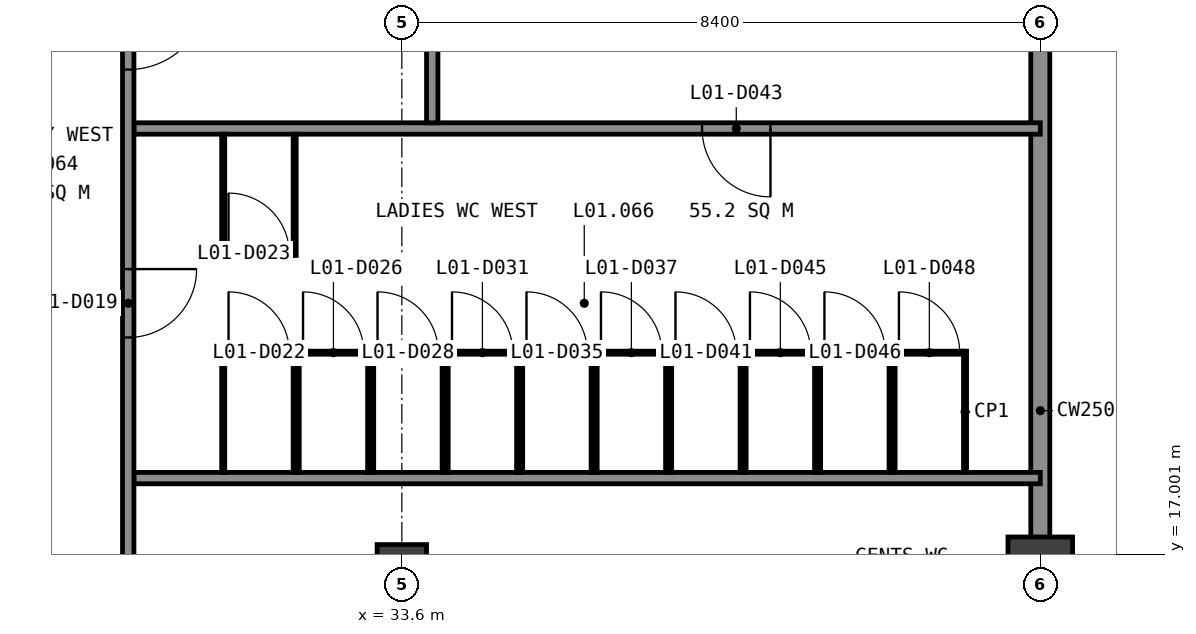
"""IFC4 building model, lengths in metres.
Left out: names, types, materials, properties, quantities, classifications, styles, units other than length and angle.
Written with IfcOpenShell. Run it as: python <this file> out.ifc"""

import sys

from ifc_helpers import new_model, si_unit, direction, frame, frame_2d, origin, origin_2d, place, context, subcontext, project, spatial, rectangle, extrude, element, fill, save


model = new_model("IFC4")
c1 = context("Model", 3, precision=1e-05, world=origin(), true_north=direction((0.0, 1.0)))
c2 = subcontext(c1, "Body", "Model", "MODEL_VIEW")
j1 = project(units=[si_unit("LENGTHUNIT", "METRE"), si_unit("PLANEANGLEUNIT", "RADIAN")], contexts=[c1])
p1 = place(None, origin())
s1 = spatial("IfcSite", under=j1, at=p1, CompositionType="ELEMENT")
p2 = place(p1, origin())
s2 = spatial("IfcBuilding", under=s1, at=p2, CompositionType="ELEMENT")
p3 = place(p2, frame((0.0, 0.0, 5.4)))
s3 = spatial("IfcBuildingStorey", under=s2, at=p3, CompositionType="ELEMENT", Elevation=5.4)
p4 = place(p3, frame((33.6, 16.8, -0.3), z_axis=(0.0, 0.0, 1.0), x_axis=(1.0, 0.0, 0.0)))
e1 = element("IfcColumn", 1, at=p4, inside=s3, PredefinedType="COLUMN", context=c2, shape_type="SweptSolid", body=[
    extrude(rectangle(XDim=0.65, YDim=0.65, at=origin_2d()), origin(), (0.0, 0.0, 1.0), 4.55),
])
p5 = place(p3, frame((42.0, 16.8, -0.3), z_axis=(0.0, 0.0, 1.0), x_axis=(1.0, 0.0, 0.0)))
e2 = element("IfcColumn", 2, at=p5, inside=s3, PredefinedType="COLUMN", context=c2, shape_type="SweptSolid", body=[
    extrude(rectangle(XDim=0.85, YDim=0.85, at=origin_2d()), origin(), (0.0, 0.0, 1.0), 4.55),
])
p6 = place(p3, frame((42.0, 12.675, -0.3), z_axis=(0.0, 0.0, 1.0), x_axis=(0.0, 1.0, 0.0)))
e3 = element("IfcWall", 3, at=p6, inside=s3, PredefinedType="SOLIDWALL", context=c2, shape_type="SweptSolid", body=[
    extrude(rectangle(XDim=12.425, YDim=0.25, at=frame_2d((6.212, 0.0))), origin(), (0.0, 0.0, 1.0), 3.9),
])
p7 = place(p3, frame((30.075, 18.0, 0.0), z_axis=(0.0, 0.0, 1.0), x_axis=(1.0, 0.0, 0.0)))
e4 = element("IfcWall", 4, at=p7, inside=s3, PredefinedType="PARTITIONING", context=c2, shape_type="SweptSolid", body=[
    extrude(rectangle(XDim=11.925, YDim=0.15, at=frame_2d((5.962, 0.0))), origin(), (0.0, 0.0, 1.0), 4.2),
])
p8 = place(p3, frame((30.075, 22.6, 0.0), z_axis=(0.0, 0.0, 1.0), x_axis=(1.0, 0.0, 0.0)))
e5 = element("IfcWall", 5, at=p8, inside=s3, PredefinedType="PARTITIONING", context=c2, shape_type="SweptSolid", body=[
    extrude(rectangle(XDim=11.925, YDim=0.15, at=frame_2d((5.962, 0.0))), origin(), (0.0, 0.0, 1.0), 4.2),
])
p9 = place(p8, frame((7.475, 0.0, 0.0)))
e6 = element("IfcOpeningElement", 6, at=p9, cuts=e5, PredefinedType="OPENING", context=c2, shape_type="SweptSolid", body=[
    extrude(rectangle(XDim=0.9, YDim=2.1, at=frame_2d((0.45, 1.05))), frame((0.0, 0.085, 0.0), z_axis=(0.0, -1.0, 0.0), x_axis=(1.0, 0.0, 0.0)), (0.0, 0.0, 1.0), 0.17),
])
p10 = place(p3, frame((30.0, 13.275, 0.0), z_axis=(0.0, 0.0, 1.0), x_axis=(0.0, 1.0, 0.0)))
e7 = element("IfcWall", 7, at=p10, inside=s3, PredefinedType="PARTITIONING", context=c2, shape_type="SweptSolid", body=[
    extrude(rectangle(XDim=11.825, YDim=0.15, at=frame_2d((5.913, 0.0))), origin(), (0.0, 0.0, 1.0), 4.2),
])
p11 = place(p10, frame((1.875, 0.0, 0.0)))
e8 = element("IfcOpeningElement", 8, at=p11, cuts=e7, PredefinedType="OPENING", context=c2, shape_type="SweptSolid", body=[
    extrude(rectangle(XDim=0.9, YDim=2.1, at=frame_2d((0.45, 1.05))), frame((0.0, 0.085, 0.0), z_axis=(0.0, -1.0, 0.0), x_axis=(1.0, 0.0, 0.0)), (0.0, 0.0, 1.0), 0.17),
])
p12 = place(p10, frame((6.575, 0.0, 0.0)))
e9 = element("IfcOpeningElement", 9, at=p12, cuts=e7, PredefinedType="OPENING", context=c2, shape_type="SweptSolid", body=[
    extrude(rectangle(XDim=0.9, YDim=2.1, at=frame_2d((0.45, 1.05))), frame((0.0, 0.085, 0.0), z_axis=(0.0, -1.0, 0.0), x_axis=(1.0, 0.0, 0.0)), (0.0, 0.0, 1.0), 0.17),
])
p13 = place(p10, frame((10.1, 0.0, 0.0)))
e10 = element("IfcOpeningElement", 10, at=p13, cuts=e7, PredefinedType="OPENING", context=c2, shape_type="SweptSolid", body=[
    extrude(rectangle(XDim=1.05, YDim=2.25, at=frame_2d((0.525, 1.125))), frame((0.0, 0.085, 0.0), z_axis=(0.0, -1.0, 0.0), x_axis=(1.0, 0.0, 0.0)), (0.0, 0.0, 1.0), 0.17),
])
p14 = place(p3, frame((34.0, 22.675, 0.0), z_axis=(0.0, 0.0, 1.0), x_axis=(0.0, 1.0, 0.0)))
e11 = element("IfcWall", 11, at=p14, inside=s3, PredefinedType="PARTITIONING", context=c2, shape_type="SweptSolid", body=[
    extrude(rectangle(XDim=2.425, YDim=0.15, at=frame_2d((1.212, 0.0))), origin(), (0.0, 0.0, 1.0), 4.2),
])
for number, where, z_axis, x_axis in (
    (12, (31.25, 18.075, 0.0), (0.0, 0.0, 1.0), (0.0, 1.0, 0.0)),
    (13, (32.19, 18.075, 0.0), (0.0, 0.0, 1.0), (0.0, 1.0, 0.0)),
):
    element("IfcWall", number, at=place(p3, frame(where, z_axis=z_axis, x_axis=x_axis)), inside=s3, PredefinedType="PARTITIONING", context=c2, shape_type="SweptSolid", body=[
        extrude(rectangle(XDim=1.595, YDim=0.04, at=frame_2d((0.797, 0.0))), origin(), (0.0, 0.0, 1.0), 2.0),
    ])
p15 = place(p3, frame((31.27, 19.65, 0.0), z_axis=(0.0, 0.0, 1.0), x_axis=(1.0, 0.0, 0.0)))
e14 = element("IfcWall", 14, at=p15, inside=s3, PredefinedType="PARTITIONING", context=c2, shape_type="SweptSolid", body=[
    extrude(rectangle(XDim=0.9, YDim=0.04, at=frame_2d((0.45, 0.0))), origin(), (0.0, 0.0, 1.0), 2.0),
])
p16 = place(p15, frame((0.05, 0.0, 0.0)))
e15 = element("IfcOpeningElement", 15, at=p16, cuts=e14, PredefinedType="OPENING", context=c2, shape_type="SweptSolid", body=[
    extrude(rectangle(XDim=0.8, YDim=2.0, at=frame_2d((0.4, 1.0))), frame((0.0, 0.03, 0.0), z_axis=(0.0, -1.0, 0.0), x_axis=(1.0, 0.0, 0.0)), (0.0, 0.0, 1.0), 0.06),
])
for number, where, z_axis, x_axis in (
    (16, (32.23, 18.075, 0.0), (0.0, 0.0, 1.0), (0.0, 1.0, 0.0)),
    (17, (33.17, 18.075, 0.0), (0.0, 0.0, 1.0), (0.0, 1.0, 0.0)),
):
    element("IfcWall", number, at=place(p3, frame(where, z_axis=z_axis, x_axis=x_axis)), inside=s3, PredefinedType="PARTITIONING", context=c2, shape_type="SweptSolid", body=[
        extrude(rectangle(XDim=1.595, YDim=0.04, at=frame_2d((0.797, 0.0))), origin(), (0.0, 0.0, 1.0), 2.0),
    ])
p17 = place(p3, frame((32.25, 19.65, 0.0), z_axis=(0.0, 0.0, 1.0), x_axis=(1.0, 0.0, 0.0)))
e18 = element("IfcWall", 18, at=p17, inside=s3, PredefinedType="PARTITIONING", context=c2, shape_type="SweptSolid", body=[
    extrude(rectangle(XDim=0.9, YDim=0.04, at=frame_2d((0.45, 0.0))), origin(), (0.0, 0.0, 1.0), 2.0),
])
p18 = place(p17, frame((0.05, 0.0, 0.0)))
e19 = element("IfcOpeningElement", 19, at=p18, cuts=e18, PredefinedType="OPENING", context=c2, shape_type="SweptSolid", body=[
    extrude(rectangle(XDim=0.8, YDim=2.0, at=frame_2d((0.4, 1.0))), frame((0.0, 0.03, 0.0), z_axis=(0.0, -1.0, 0.0), x_axis=(1.0, 0.0, 0.0)), (0.0, 0.0, 1.0), 0.06),
])
for number, where, z_axis, x_axis in (
    (20, (33.21, 18.075, 0.0), (0.0, 0.0, 1.0), (0.0, 1.0, 0.0)),
    (21, (34.15, 18.075, 0.0), (0.0, 0.0, 1.0), (0.0, 1.0, 0.0)),
):
    element("IfcWall", number, at=place(p3, frame(where, z_axis=z_axis, x_axis=x_axis)), inside=s3, PredefinedType="PARTITIONING", context=c2, shape_type="SweptSolid", body=[
        extrude(rectangle(XDim=1.595, YDim=0.04, at=frame_2d((0.797, 0.0))), origin(), (0.0, 0.0, 1.0), 2.0),
    ])
p19 = place(p3, frame((33.23, 19.65, 0.0), z_axis=(0.0, 0.0, 1.0), x_axis=(1.0, 0.0, 0.0)))
e22 = element("IfcWall", 22, at=p19, inside=s3, PredefinedType="PARTITIONING", context=c2, shape_type="SweptSolid", body=[
    extrude(rectangle(XDim=0.9, YDim=0.04, at=frame_2d((0.45, 0.0))), origin(), (0.0, 0.0, 1.0), 2.0),
])
p20 = place(p19, frame((0.05, 0.0, 0.0)))
e23 = element("IfcOpeningElement", 23, at=p20, cuts=e22, PredefinedType="OPENING", context=c2, shape_type="SweptSolid", body=[
    extrude(rectangle(XDim=0.8, YDim=2.0, at=frame_2d((0.4, 1.0))), frame((0.0, 0.03, 0.0), z_axis=(0.0, -1.0, 0.0), x_axis=(1.0, 0.0, 0.0)), (0.0, 0.0, 1.0), 0.06),
])
for number, where, z_axis, x_axis in (
    (24, (34.19, 18.075, 0.0), (0.0, 0.0, 1.0), (0.0, 1.0, 0.0)),
    (25, (35.13, 18.075, 0.0), (0.0, 0.0, 1.0), (0.0, 1.0, 0.0)),
):
    element("IfcWall", number, at=place(p3, frame(where, z_axis=z_axis, x_axis=x_axis)), inside=s3, PredefinedType="PARTITIONING", context=c2, shape_type="SweptSolid", body=[
        extrude(rectangle(XDim=1.595, YDim=0.04, at=frame_2d((0.797, 0.0))), origin(), (0.0, 0.0, 1.0), 2.0),
    ])
p21 = place(p3, frame((34.21, 19.65, 0.0), z_axis=(0.0, 0.0, 1.0), x_axis=(1.0, 0.0, 0.0)))
e26 = element("IfcWall", 26, at=p21, inside=s3, PredefinedType="PARTITIONING", context=c2, shape_type="SweptSolid", body=[
    extrude(rectangle(XDim=0.9, YDim=0.04, at=frame_2d((0.45, 0.0))), origin(), (0.0, 0.0, 1.0), 2.0),
])
p22 = place(p21, frame((0.05, 0.0, 0.0)))
e27 = element("IfcOpeningElement", 27, at=p22, cuts=e26, PredefinedType="OPENING", context=c2, shape_type="SweptSolid", body=[
    extrude(rectangle(XDim=0.8, YDim=2.0, at=frame_2d((0.4, 1.0))), frame((0.0, 0.03, 0.0), z_axis=(0.0, -1.0, 0.0), x_axis=(1.0, 0.0, 0.0)), (0.0, 0.0, 1.0), 0.06),
])
for number, where, z_axis, x_axis in (
    (28, (35.17, 18.075, 0.0), (0.0, 0.0, 1.0), (0.0, 1.0, 0.0)),
    (29, (36.11, 18.075, 0.0), (0.0, 0.0, 1.0), (0.0, 1.0, 0.0)),
):
    element("IfcWall", number, at=place(p3, frame(where, z_axis=z_axis, x_axis=x_axis)), inside=s3, PredefinedType="PARTITIONING", context=c2, shape_type="SweptSolid", body=[
        extrude(rectangle(XDim=1.595, YDim=0.04, at=frame_2d((0.797, 0.0))), origin(), (0.0, 0.0, 1.0), 2.0),
    ])
p23 = place(p3, frame((35.19, 19.65, 0.0), z_axis=(0.0, 0.0, 1.0), x_axis=(1.0, 0.0, 0.0)))
e30 = element("IfcWall", 30, at=p23, inside=s3, PredefinedType="PARTITIONING", context=c2, shape_type="SweptSolid", body=[
    extrude(rectangle(XDim=0.9, YDim=0.04, at=frame_2d((0.45, 0.0))), origin(), (0.0, 0.0, 1.0), 2.0),
])
p24 = place(p23, frame((0.05, 0.0, 0.0)))
e31 = element("IfcOpeningElement", 31, at=p24, cuts=e30, PredefinedType="OPENING", context=c2, shape_type="SweptSolid", body=[
    extrude(rectangle(XDim=0.8, YDim=2.0, at=frame_2d((0.4, 1.0))), frame((0.0, 0.03, 0.0), z_axis=(0.0, -1.0, 0.0), x_axis=(1.0, 0.0, 0.0)), (0.0, 0.0, 1.0), 0.06),
])
for number, where, z_axis, x_axis in (
    (32, (36.15, 18.075, 0.0), (0.0, 0.0, 1.0), (0.0, 1.0, 0.0)),
    (33, (37.09, 18.075, 0.0), (0.0, 0.0, 1.0), (0.0, 1.0, 0.0)),
):
    element("IfcWall", number, at=place(p3, frame(where, z_axis=z_axis, x_axis=x_axis)), inside=s3, PredefinedType="PARTITIONING", context=c2, shape_type="SweptSolid", body=[
        extrude(rectangle(XDim=1.595, YDim=0.04, at=frame_2d((0.797, 0.0))), origin(), (0.0, 0.0, 1.0), 2.0),
    ])
p25 = place(p3, frame((36.17, 19.65, 0.0), z_axis=(0.0, 0.0, 1.0), x_axis=(1.0, 0.0, 0.0)))
e34 = element("IfcWall", 34, at=p25, inside=s3, PredefinedType="PARTITIONING", context=c2, shape_type="SweptSolid", body=[
    extrude(rectangle(XDim=0.9, YDim=0.04, at=frame_2d((0.45, 0.0))), origin(), (0.0, 0.0, 1.0), 2.0),
])
p26 = place(p25, frame((0.05, 0.0, 0.0)))
e35 = element("IfcOpeningElement", 35, at=p26, cuts=e34, PredefinedType="OPENING", context=c2, shape_type="SweptSolid", body=[
    extrude(rectangle(XDim=0.8, YDim=2.0, at=frame_2d((0.4, 1.0))), frame((0.0, 0.03, 0.0), z_axis=(0.0, -1.0, 0.0), x_axis=(1.0, 0.0, 0.0)), (0.0, 0.0, 1.0), 0.06),
])
for number, where, z_axis, x_axis in (
    (36, (37.13, 18.075, 0.0), (0.0, 0.0, 1.0), (0.0, 1.0, 0.0)),
    (37, (38.07, 18.075, 0.0), (0.0, 0.0, 1.0), (0.0, 1.0, 0.0)),
):
    element("IfcWall", number, at=place(p3, frame(where, z_axis=z_axis, x_axis=x_axis)), inside=s3, PredefinedType="PARTITIONING", context=c2, shape_type="SweptSolid", body=[
        extrude(rectangle(XDim=1.595, YDim=0.04, at=frame_2d((0.797, 0.0))), origin(), (0.0, 0.0, 1.0), 2.0),
    ])
p27 = place(p3, frame((37.15, 19.65, 0.0), z_axis=(0.0, 0.0, 1.0), x_axis=(1.0, 0.0, 0.0)))
e38 = element("IfcWall", 38, at=p27, inside=s3, PredefinedType="PARTITIONING", context=c2, shape_type="SweptSolid", body=[
    extrude(rectangle(XDim=0.9, YDim=0.04, at=frame_2d((0.45, 0.0))), origin(), (0.0, 0.0, 1.0), 2.0),
])
p28 = place(p27, frame((0.05, 0.0, 0.0)))
e39 = element("IfcOpeningElement", 39, at=p28, cuts=e38, PredefinedType="OPENING", context=c2, shape_type="SweptSolid", body=[
    extrude(rectangle(XDim=0.8, YDim=2.0, at=frame_2d((0.4, 1.0))), frame((0.0, 0.03, 0.0), z_axis=(0.0, -1.0, 0.0), x_axis=(1.0, 0.0, 0.0)), (0.0, 0.0, 1.0), 0.06),
])
for number, where, z_axis, x_axis in (
    (40, (38.11, 18.075, 0.0), (0.0, 0.0, 1.0), (0.0, 1.0, 0.0)),
    (41, (39.05, 18.075, 0.0), (0.0, 0.0, 1.0), (0.0, 1.0, 0.0)),
):
    element("IfcWall", number, at=place(p3, frame(where, z_axis=z_axis, x_axis=x_axis)), inside=s3, PredefinedType="PARTITIONING", context=c2, shape_type="SweptSolid", body=[
        extrude(rectangle(XDim=1.595, YDim=0.04, at=frame_2d((0.797, 0.0))), origin(), (0.0, 0.0, 1.0), 2.0),
    ])
p29 = place(p3, frame((38.13, 19.65, 0.0), z_axis=(0.0, 0.0, 1.0), x_axis=(1.0, 0.0, 0.0)))
e42 = element("IfcWall", 42, at=p29, inside=s3, PredefinedType="PARTITIONING", context=c2, shape_type="SweptSolid", body=[
    extrude(rectangle(XDim=0.9, YDim=0.04, at=frame_2d((0.45, 0.0))), origin(), (0.0, 0.0, 1.0), 2.0),
])
p30 = place(p29, frame((0.05, 0.0, 0.0)))
e43 = element("IfcOpeningElement", 43, at=p30, cuts=e42, PredefinedType="OPENING", context=c2, shape_type="SweptSolid", body=[
    extrude(rectangle(XDim=0.8, YDim=2.0, at=frame_2d((0.4, 1.0))), frame((0.0, 0.03, 0.0), z_axis=(0.0, -1.0, 0.0), x_axis=(1.0, 0.0, 0.0)), (0.0, 0.0, 1.0), 0.06),
])
for number, where, z_axis, x_axis in (
    (44, (39.09, 18.075, 0.0), (0.0, 0.0, 1.0), (0.0, 1.0, 0.0)),
    (45, (40.03, 18.075, 0.0), (0.0, 0.0, 1.0), (0.0, 1.0, 0.0)),
):
    element("IfcWall", number, at=place(p3, frame(where, z_axis=z_axis, x_axis=x_axis)), inside=s3, PredefinedType="PARTITIONING", context=c2, shape_type="SweptSolid", body=[
        extrude(rectangle(XDim=1.595, YDim=0.04, at=frame_2d((0.797, 0.0))), origin(), (0.0, 0.0, 1.0), 2.0),
    ])
p31 = place(p3, frame((39.11, 19.65, 0.0), z_axis=(0.0, 0.0, 1.0), x_axis=(1.0, 0.0, 0.0)))
e46 = element("IfcWall", 46, at=p31, inside=s3, PredefinedType="PARTITIONING", context=c2, shape_type="SweptSolid", body=[
    extrude(rectangle(XDim=0.9, YDim=0.04, at=frame_2d((0.45, 0.0))), origin(), (0.0, 0.0, 1.0), 2.0),
])
p32 = place(p31, frame((0.05, 0.0, 0.0)))
e47 = element("IfcOpeningElement", 47, at=p32, cuts=e46, PredefinedType="OPENING", context=c2, shape_type="SweptSolid", body=[
    extrude(rectangle(XDim=0.8, YDim=2.0, at=frame_2d((0.4, 1.0))), frame((0.0, 0.03, 0.0), z_axis=(0.0, -1.0, 0.0), x_axis=(1.0, 0.0, 0.0)), (0.0, 0.0, 1.0), 0.06),
])
for number, where, z_axis, x_axis in (
    (48, (40.07, 18.075, 0.0), (0.0, 0.0, 1.0), (0.0, 1.0, 0.0)),
    (49, (41.01, 18.075, 0.0), (0.0, 0.0, 1.0), (0.0, 1.0, 0.0)),
):
    element("IfcWall", number, at=place(p3, frame(where, z_axis=z_axis, x_axis=x_axis)), inside=s3, PredefinedType="PARTITIONING", context=c2, shape_type="SweptSolid", body=[
        extrude(rectangle(XDim=1.595, YDim=0.04, at=frame_2d((0.797, 0.0))), origin(), (0.0, 0.0, 1.0), 2.0),
    ])
p33 = place(p3, frame((40.09, 19.65, 0.0), z_axis=(0.0, 0.0, 1.0), x_axis=(1.0, 0.0, 0.0)))
e50 = element("IfcWall", 50, at=p33, inside=s3, PredefinedType="PARTITIONING", context=c2, shape_type="SweptSolid", body=[
    extrude(rectangle(XDim=0.9, YDim=0.04, at=frame_2d((0.45, 0.0))), origin(), (0.0, 0.0, 1.0), 2.0),
])
p34 = place(p33, frame((0.05, 0.0, 0.0)))
e51 = element("IfcOpeningElement", 51, at=p34, cuts=e50, PredefinedType="OPENING", context=c2, shape_type="SweptSolid", body=[
    extrude(rectangle(XDim=0.8, YDim=2.0, at=frame_2d((0.4, 1.0))), frame((0.0, 0.03, 0.0), z_axis=(0.0, -1.0, 0.0), x_axis=(1.0, 0.0, 0.0)), (0.0, 0.0, 1.0), 0.06),
])
for number, where, z_axis, x_axis in (
    (52, (31.25, 22.525, 0.0), (0.0, 0.0, 1.0), (0.0, -1.0, 0.0)),
    (53, (32.19, 22.525, 0.0), (0.0, 0.0, 1.0), (0.0, -1.0, 0.0)),
):
    element("IfcWall", number, at=place(p3, frame(where, z_axis=z_axis, x_axis=x_axis)), inside=s3, PredefinedType="PARTITIONING", context=c2, shape_type="SweptSolid", body=[
        extrude(rectangle(XDim=1.595, YDim=0.04, at=frame_2d((0.797, 0.0))), origin(), (0.0, 0.0, 1.0), 2.0),
    ])
p35 = place(p3, frame((31.27, 20.95, 0.0), z_axis=(0.0, 0.0, 1.0), x_axis=(1.0, 0.0, 0.0)))
e54 = element("IfcWall", 54, at=p35, inside=s3, PredefinedType="PARTITIONING", context=c2, shape_type="SweptSolid", body=[
    extrude(rectangle(XDim=0.9, YDim=0.04, at=frame_2d((0.45, 0.0))), origin(), (0.0, 0.0, 1.0), 2.0),
])
p36 = place(p35, frame((0.05, 0.0, 0.0)))
e55 = element("IfcOpeningElement", 55, at=p36, cuts=e54, PredefinedType="OPENING", context=c2, shape_type="SweptSolid", body=[
    extrude(rectangle(XDim=0.8, YDim=2.0, at=frame_2d((0.4, 1.0))), frame((0.0, 0.03, 0.0), z_axis=(0.0, -1.0, 0.0), x_axis=(1.0, 0.0, 0.0)), (0.0, 0.0, 1.0), 0.06),
])
p37 = place(p12, origin())
e56 = element("IfcDoor", 56, at=p37, inside=s3, OperationType="SINGLE_SWING_RIGHT", PredefinedType="DOOR", context=c2, shape_type="SweptSolid", body=[
    extrude(rectangle(XDim=0.9, YDim=2.1, at=frame_2d((0.45, 1.05))), frame((0.0, 0.025, 0.0), z_axis=(0.0, -1.0, 0.0), x_axis=(1.0, 0.0, 0.0)), (0.0, 0.0, 1.0), 0.05),
])
fill(e9, e56)
p38 = place(p13, origin())
e57 = element("IfcDoor", 57, at=p38, inside=s3, OperationType="SINGLE_SWING_RIGHT", PredefinedType="DOOR", context=c2, shape_type="SweptSolid", body=[
    extrude(rectangle(XDim=1.05, YDim=2.25, at=frame_2d((0.525, 1.125))), frame((0.0, 0.025, 0.0), z_axis=(0.0, -1.0, 0.0), x_axis=(1.0, 0.0, 0.0)), (0.0, 0.0, 1.0), 0.05),
])
fill(e10, e57)
p39 = place(p9, origin())
e58 = element("IfcDoor", 58, at=p39, inside=s3, OperationType="SINGLE_SWING_RIGHT", PredefinedType="DOOR", context=c2, shape_type="SweptSolid", body=[
    extrude(rectangle(XDim=0.9, YDim=2.1, at=frame_2d((0.45, 1.05))), frame((0.0, 0.025, 0.0), z_axis=(0.0, -1.0, 0.0), x_axis=(1.0, 0.0, 0.0)), (0.0, 0.0, 1.0), 0.05),
])
fill(e6, e58)
p40 = place(p16, origin())
e59 = element("IfcDoor", 59, at=p40, inside=s3, OperationType="SINGLE_SWING_LEFT", PredefinedType="DOOR", context=c2, shape_type="SweptSolid", body=[
    extrude(rectangle(XDim=0.8, YDim=2.0, at=frame_2d((0.4, 1.0))), frame((0.0, 0.02, 0.0), z_axis=(0.0, -1.0, 0.0), x_axis=(1.0, 0.0, 0.0)), (0.0, 0.0, 1.0), 0.04),
])
fill(e15, e59)
p41 = place(p18, origin())
e60 = element("IfcDoor", 60, at=p41, inside=s3, OperationType="SINGLE_SWING_LEFT", PredefinedType="DOOR", context=c2, shape_type="SweptSolid", body=[
    extrude(rectangle(XDim=0.8, YDim=2.0, at=frame_2d((0.4, 1.0))), frame((0.0, 0.02, 0.0), z_axis=(0.0, -1.0, 0.0), x_axis=(1.0, 0.0, 0.0)), (0.0, 0.0, 1.0), 0.04),
])
fill(e19, e60)
p42 = place(p20, origin())
e61 = element("IfcDoor", 61, at=p42, inside=s3, OperationType="SINGLE_SWING_LEFT", PredefinedType="DOOR", context=c2, shape_type="SweptSolid", body=[
    extrude(rectangle(XDim=0.8, YDim=2.0, at=frame_2d((0.4, 1.0))), frame((0.0, 0.02, 0.0), z_axis=(0.0, -1.0, 0.0), x_axis=(1.0, 0.0, 0.0)), (0.0, 0.0, 1.0), 0.04),
])
fill(e23, e61)
p43 = place(p22, origin())
e62 = element("IfcDoor", 62, at=p43, inside=s3, OperationType="SINGLE_SWING_LEFT", PredefinedType="DOOR", context=c2, shape_type="SweptSolid", body=[
    extrude(rectangle(XDim=0.8, YDim=2.0, at=frame_2d((0.4, 1.0))), frame((0.0, 0.02, 0.0), z_axis=(0.0, -1.0, 0.0), x_axis=(1.0, 0.0, 0.0)), (0.0, 0.0, 1.0), 0.04),
])
fill(e27, e62)
p44 = place(p24, origin())
e63 = element("IfcDoor", 63, at=p44, inside=s3, OperationType="SINGLE_SWING_LEFT", PredefinedType="DOOR", context=c2, shape_type="SweptSolid", body=[
    extrude(rectangle(XDim=0.8, YDim=2.0, at=frame_2d((0.4, 1.0))), frame((0.0, 0.02, 0.0), z_axis=(0.0, -1.0, 0.0), x_axis=(1.0, 0.0, 0.0)), (0.0, 0.0, 1.0), 0.04),
])
fill(e31, e63)
p45 = place(p26, origin())
e64 = element("IfcDoor", 64, at=p45, inside=s3, OperationType="SINGLE_SWING_LEFT", PredefinedType="DOOR", context=c2, shape_type="SweptSolid", body=[
    extrude(rectangle(XDim=0.8, YDim=2.0, at=frame_2d((0.4, 1.0))), frame((0.0, 0.02, 0.0), z_axis=(0.0, -1.0, 0.0), x_axis=(1.0, 0.0, 0.0)), (0.0, 0.0, 1.0), 0.04),
])
fill(e35, e64)
p46 = place(p28, origin())
e65 = element("IfcDoor", 65, at=p46, inside=s3, OperationType="SINGLE_SWING_LEFT", PredefinedType="DOOR", context=c2, shape_type="SweptSolid", body=[
    extrude(rectangle(XDim=0.8, YDim=2.0, at=frame_2d((0.4, 1.0))), frame((0.0, 0.02, 0.0), z_axis=(0.0, -1.0, 0.0), x_axis=(1.0, 0.0, 0.0)), (0.0, 0.0, 1.0), 0.04),
])
fill(e39, e65)
p47 = place(p30, origin())
e66 = element("IfcDoor", 66, at=p47, inside=s3, OperationType="SINGLE_SWING_LEFT", PredefinedType="DOOR", context=c2, shape_type="SweptSolid", body=[
    extrude(rectangle(XDim=0.8, YDim=2.0, at=frame_2d((0.4, 1.0))), frame((0.0, 0.02, 0.0), z_axis=(0.0, -1.0, 0.0), x_axis=(1.0, 0.0, 0.0)), (0.0, 0.0, 1.0), 0.04),
])
fill(e43, e66)
p48 = place(p32, origin())
e67 = element("IfcDoor", 67, at=p48, inside=s3, OperationType="SINGLE_SWING_LEFT", PredefinedType="DOOR", context=c2, shape_type="SweptSolid", body=[
    extrude(rectangle(XDim=0.8, YDim=2.0, at=frame_2d((0.4, 1.0))), frame((0.0, 0.02, 0.0), z_axis=(0.0, -1.0, 0.0), x_axis=(1.0, 0.0, 0.0)), (0.0, 0.0, 1.0), 0.04),
])
fill(e47, e67)
p49 = place(p34, origin())
e68 = element("IfcDoor", 68, at=p49, inside=s3, OperationType="SINGLE_SWING_LEFT", PredefinedType="DOOR", context=c2, shape_type="SweptSolid", body=[
    extrude(rectangle(XDim=0.8, YDim=2.0, at=frame_2d((0.4, 1.0))), frame((0.0, 0.02, 0.0), z_axis=(0.0, -1.0, 0.0), x_axis=(1.0, 0.0, 0.0)), (0.0, 0.0, 1.0), 0.04),
])
fill(e51, e68)
p50 = place(p36, origin())
e69 = element("IfcDoor", 69, at=p50, inside=s3, OperationType="SINGLE_SWING_LEFT", PredefinedType="DOOR", context=c2, shape_type="SweptSolid", body=[
    extrude(rectangle(XDim=0.8, YDim=2.0, at=frame_2d((0.4, 1.0))), frame((0.0, 0.02, 0.0), z_axis=(0.0, -1.0, 0.0), x_axis=(1.0, 0.0, 0.0)), (0.0, 0.0, 1.0), 0.04),
])
fill(e55, e69)
save(model, sys.argv[1])
